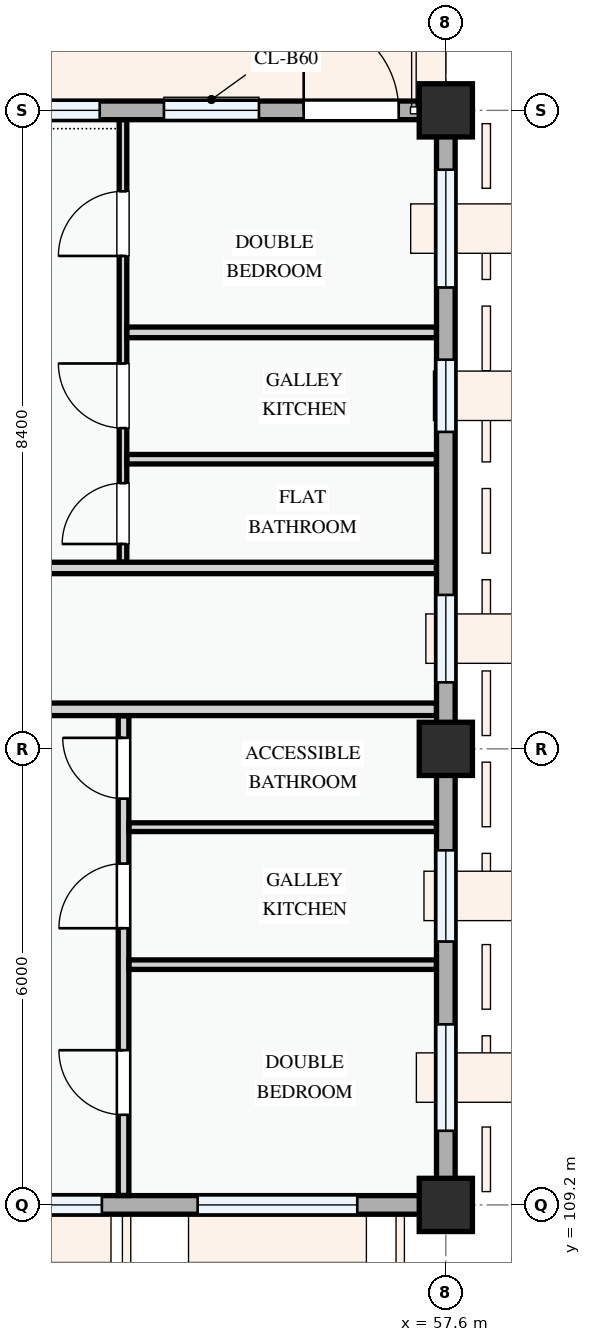
"""IFC4 building model, lengths in metres.
Left out: names, types, materials, properties, quantities, classifications, styles, units other than length and angle.
Written with IfcOpenShell. Run it as: python <this file> out.ifc"""

import sys

from ifc_helpers import new_model, si_unit, direction, frame, frame_2d, origin, origin_2d, place, context, subcontext, project, spatial, rectangle, extrude, element, fill, save


model = new_model("IFC4")
c1 = context("Model", 3, precision=1e-05, world=origin(), true_north=direction((0.0, 1.0)))
c2 = subcontext(c1, "Body", "Model", "MODEL_VIEW")
j1 = project(units=[si_unit("LENGTHUNIT", "METRE"), si_unit("PLANEANGLEUNIT", "RADIAN")], contexts=[c1])
p1 = place(None, origin())
s1 = spatial("IfcSite", under=j1, at=p1, CompositionType="ELEMENT")
p2 = place(p1, origin())
s2 = spatial("IfcBuilding", under=s1, at=p2, CompositionType="ELEMENT")
p3 = place(p2, frame((0.0, 0.0, 8.1)))
s3 = spatial("IfcBuildingStorey", under=s2, at=p3, CompositionType="ELEMENT", Elevation=8.1)
for number, where, z_axis, x_axis in (
    (1, (57.6, 109.2, 0.0), (0.0, 0.0, 1.0), (1.0, 0.0, 0.0)),
    (2, (57.6, 115.2, 0.0), (0.0, 0.0, 1.0), (1.0, 0.0, 0.0)),
    (3, (57.6, 123.6, 0.0), (0.0, 0.0, 1.0), (1.0, 0.0, 0.0)),
):
    element("IfcColumn", number, at=place(p3, frame(where, z_axis=z_axis, x_axis=x_axis)), inside=s3, PredefinedType="COLUMN", context=c2, shape_type="SweptSolid", body=[
        extrude(rectangle(XDim=0.7, YDim=0.7, at=origin_2d()), origin(), (0.0, 0.0, 1.0), 3.3),
    ])
p4 = place(p3, frame((51.6, 109.2, 0.0), z_axis=(0.0, 0.0, 1.0), x_axis=(1.0, 0.0, 0.0)))
e4 = element("IfcWall", 4, at=p4, inside=s3, PredefinedType="STANDARD", context=c2, shape_type="SweptSolid", body=[
    extrude(rectangle(XDim=6.0, YDim=0.245, at=frame_2d((3.0, 0.0))), origin(), (0.0, 0.0, 1.0), 2.475),
])
p5 = place(p4, frame((0.475, 0.0, 0.78)))
e5 = element("IfcOpeningElement", 5, at=p5, cuts=e4, PredefinedType="OPENING", context=c2, shape_type="SweptSolid", body=[
    extrude(rectangle(XDim=1.0, YDim=1.25, at=frame_2d((0.5, 0.625))), frame((0.0, 0.133, 0.0), z_axis=(0.0, -1.0, 0.0), x_axis=(1.0, 0.0, 0.0)), (0.0, 0.0, 1.0), 0.265),
])
p6 = place(p4, frame((2.735, 0.0, 0.78)))
e6 = element("IfcOpeningElement", 6, at=p6, cuts=e4, PredefinedType="OPENING", context=c2, shape_type="SweptSolid", body=[
    extrude(rectangle(XDim=2.1, YDim=1.55, at=frame_2d((1.05, 0.775))), frame((0.0, 0.133, 0.0), z_axis=(0.0, -1.0, 0.0), x_axis=(1.0, 0.0, 0.0)), (0.0, 0.0, 1.0), 0.265),
])
p7 = place(p3, frame((57.6, 109.2, 0.0), z_axis=(0.0, 0.0, 1.0), x_axis=(0.0, 1.0, 0.0)))
e7 = element("IfcWall", 7, at=p7, inside=s3, PredefinedType="STANDARD", context=c2, shape_type="SweptSolid", body=[
    extrude(rectangle(XDim=6.0, YDim=0.245, at=frame_2d((3.0, 0.0))), origin(), (0.0, 0.0, 1.0), 2.575),
])
p8 = place(p7, frame((0.975, 0.0, 0.78)))
e8 = element("IfcOpeningElement", 8, at=p8, cuts=e7, PredefinedType="OPENING", context=c2, shape_type="SweptSolid", body=[
    extrude(rectangle(XDim=1.4, YDim=1.45, at=frame_2d((0.7, 0.725))), frame((0.0, 0.133, 0.0), z_axis=(0.0, -1.0, 0.0), x_axis=(1.0, 0.0, 0.0)), (0.0, 0.0, 1.0), 0.265),
])
p9 = place(p7, frame((3.465, 0.0, 0.78)))
e9 = element("IfcOpeningElement", 9, at=p9, cuts=e7, PredefinedType="OPENING", context=c2, shape_type="SweptSolid", body=[
    extrude(rectangle(XDim=1.2, YDim=1.35, at=frame_2d((0.6, 0.675))), frame((0.0, 0.133, 0.0), z_axis=(0.0, -1.0, 0.0), x_axis=(1.0, 0.0, 0.0)), (0.0, 0.0, 1.0), 0.265),
])
p10 = place(p3, frame((57.6, 115.2, 0.0), z_axis=(0.0, 0.0, 1.0), x_axis=(0.0, 1.0, 0.0)))
e10 = element("IfcWall", 10, at=p10, inside=s3, PredefinedType="STANDARD", context=c2, shape_type="SweptSolid", body=[
    extrude(rectangle(XDim=8.4, YDim=0.245, at=frame_2d((4.2, 0.0))), origin(), (0.0, 0.0, 1.0), 2.425),
])
p11 = place(p10, frame((0.875, 0.0, 0.78)))
e11 = element("IfcOpeningElement", 11, at=p11, cuts=e10, PredefinedType="OPENING", context=c2, shape_type="SweptSolid", body=[
    extrude(rectangle(XDim=1.15, YDim=1.25, at=frame_2d((0.575, 0.625))), frame((0.0, 0.133, 0.0), z_axis=(0.0, -1.0, 0.0), x_axis=(1.0, 0.0, 0.0)), (0.0, 0.0, 1.0), 0.265),
])
p12 = place(p10, frame((4.17, 0.0, 0.78)))
e12 = element("IfcOpeningElement", 12, at=p12, cuts=e10, PredefinedType="OPENING", context=c2, shape_type="SweptSolid", body=[
    extrude(rectangle(XDim=0.95, YDim=1.15, at=frame_2d((0.475, 0.575))), frame((0.0, 0.133, 0.0), z_axis=(0.0, -1.0, 0.0), x_axis=(1.0, 0.0, 0.0)), (0.0, 0.0, 1.0), 0.265),
])
p13 = place(p10, frame((6.07, 0.0, 0.78)))
e13 = element("IfcOpeningElement", 13, at=p13, cuts=e10, PredefinedType="OPENING", context=c2, shape_type="SweptSolid", body=[
    extrude(rectangle(XDim=1.55, YDim=1.4, at=frame_2d((0.775, 0.7))), frame((0.0, 0.133, 0.0), z_axis=(0.0, -1.0, 0.0), x_axis=(1.0, 0.0, 0.0)), (0.0, 0.0, 1.0), 0.265),
])
p14 = place(p3, frame((57.6, 123.6, 0.0), z_axis=(0.0, 0.0, 1.0), x_axis=(-1.0, 0.0, 0.0)))
e14 = element("IfcWall", 14, at=p14, inside=s3, PredefinedType="STANDARD", context=c2, shape_type="SweptSolid", body=[
    extrude(rectangle(XDim=6.0, YDim=0.245, at=frame_2d((3.0, 0.0))), origin(), (0.0, 0.0, 1.0), 2.445),
])
p15 = place(p14, frame((0.62, 0.0, 0.0)))
e15 = element("IfcOpeningElement", 15, at=p15, cuts=e14, PredefinedType="OPENING", context=c2, shape_type="SweptSolid", body=[
    extrude(rectangle(XDim=1.25, YDim=2.2, at=frame_2d((0.625, 1.1))), frame((0.0, 0.133, 0.0), z_axis=(0.0, -1.0, 0.0), x_axis=(1.0, 0.0, 0.0)), (0.0, 0.0, 1.0), 0.265),
])
p16 = place(p14, frame((2.458, 0.0, 0.78)))
e16 = element("IfcOpeningElement", 16, at=p16, cuts=e14, PredefinedType="OPENING", context=c2, shape_type="SweptSolid", body=[
    extrude(rectangle(XDim=1.25, YDim=1.45, at=frame_2d((0.625, 0.725))), frame((0.0, 0.133, 0.0), z_axis=(0.0, -1.0, 0.0), x_axis=(1.0, 0.0, 0.0)), (0.0, 0.0, 1.0), 0.265),
])
p17 = place(p14, frame((4.554, 0.0, 0.78)))
e17 = element("IfcOpeningElement", 17, at=p17, cuts=e14, PredefinedType="OPENING", context=c2, shape_type="SweptSolid", body=[
    extrude(rectangle(XDim=0.95, YDim=1.15, at=frame_2d((0.475, 0.575))), frame((0.0, 0.133, 0.0), z_axis=(0.0, -1.0, 0.0), x_axis=(1.0, 0.0, 0.0)), (0.0, 0.0, 1.0), 0.265),
])
p18 = place(p3, frame((53.36, 109.324, 0.0), z_axis=(0.0, 0.0, 1.0), x_axis=(0.0, 1.0, 0.0)))
e18 = element("IfcWall", 18, at=p18, inside=s3, PredefinedType="PARTITIONING", context=c2, shape_type="SweptSolid", body=[
    extrude(rectangle(XDim=6.311, YDim=0.14, at=frame_2d((3.156, 0.0))), origin(), (0.0, 0.0, 1.0), 3.0),
])
p19 = place(p18, frame((1.061, 0.0, 0.0)))
e19 = element("IfcOpeningElement", 19, at=p19, cuts=e18, PredefinedType="OPENING", context=c2, shape_type="SweptSolid", body=[
    extrude(rectangle(XDim=0.85, YDim=2.1, at=frame_2d((0.425, 1.05))), frame((0.0, 0.08, 0.0), z_axis=(0.0, -1.0, 0.0), x_axis=(1.0, 0.0, 0.0)), (0.0, 0.0, 1.0), 0.16),
])
p20 = place(p18, frame((3.516, 0.0, 0.0)))
e20 = element("IfcOpeningElement", 20, at=p20, cuts=e18, PredefinedType="OPENING", context=c2, shape_type="SweptSolid", body=[
    extrude(rectangle(XDim=0.85, YDim=2.1, at=frame_2d((0.425, 1.05))), frame((0.0, 0.08, 0.0), z_axis=(0.0, -1.0, 0.0), x_axis=(1.0, 0.0, 0.0)), (0.0, 0.0, 1.0), 0.16),
])
p21 = place(p18, frame((5.22, 0.0, 0.0)))
e21 = element("IfcOpeningElement", 21, at=p21, cuts=e18, PredefinedType="OPENING", context=c2, shape_type="SweptSolid", body=[
    extrude(rectangle(XDim=0.8, YDim=2.1, at=frame_2d((0.4, 1.05))), frame((0.0, 0.08, 0.0), z_axis=(0.0, -1.0, 0.0), x_axis=(1.0, 0.0, 0.0)), (0.0, 0.0, 1.0), 0.16),
])
p22 = place(p3, frame((53.432, 112.361, 0.0), z_axis=(0.0, 0.0, 1.0), x_axis=(1.0, 0.0, 0.0)))
e22 = element("IfcWall", 22, at=p22, inside=s3, PredefinedType="PARTITIONING", context=c2, shape_type="SweptSolid", body=[
    extrude(rectangle(XDim=4.044, YDim=0.125, at=frame_2d((2.022, 0.0))), origin(), (0.0, 0.0, 1.0), 3.0),
])
p23 = place(p3, frame((53.432, 114.17, 0.0), z_axis=(0.0, 0.0, 1.0), x_axis=(1.0, 0.0, 0.0)))
e23 = element("IfcWall", 23, at=p23, inside=s3, PredefinedType="PARTITIONING", context=c2, shape_type="SweptSolid", body=[
    extrude(rectangle(XDim=4.044, YDim=0.115, at=frame_2d((2.022, 0.0))), origin(), (0.0, 0.0, 1.0), 3.0),
])
p24 = place(p3, frame((53.353, 117.657, 0.0), z_axis=(0.0, 0.0, 1.0), x_axis=(0.0, 1.0, 0.0)))
e24 = element("IfcWall", 24, at=p24, inside=s3, PredefinedType="PARTITIONING", context=c2, shape_type="SweptSolid", body=[
    extrude(rectangle(XDim=5.819, YDim=0.1, at=frame_2d((2.909, 0.0))), origin(), (0.0, 0.0, 1.0), 3.0),
])
p25 = place(p24, frame((0.238, 0.0, 0.0)))
e25 = element("IfcOpeningElement", 25, at=p25, cuts=e24, PredefinedType="OPENING", context=c2, shape_type="SweptSolid", body=[
    extrude(rectangle(XDim=0.8, YDim=2.1, at=frame_2d((0.4, 1.05))), frame((0.0, 0.06, 0.0), z_axis=(0.0, -1.0, 0.0), x_axis=(1.0, 0.0, 0.0)), (0.0, 0.0, 1.0), 0.12),
])
p26 = place(p24, frame((1.763, 0.0, 0.0)))
e26 = element("IfcOpeningElement", 26, at=p26, cuts=e24, PredefinedType="OPENING", context=c2, shape_type="SweptSolid", body=[
    extrude(rectangle(XDim=0.85, YDim=2.1, at=frame_2d((0.425, 1.05))), frame((0.0, 0.06, 0.0), z_axis=(0.0, -1.0, 0.0), x_axis=(1.0, 0.0, 0.0)), (0.0, 0.0, 1.0), 0.12),
])
p27 = place(p24, frame((4.028, 0.0, 0.0)))
e27 = element("IfcOpeningElement", 27, at=p27, cuts=e24, PredefinedType="OPENING", context=c2, shape_type="SweptSolid", body=[
    extrude(rectangle(XDim=0.85, YDim=2.1, at=frame_2d((0.425, 1.05))), frame((0.0, 0.06, 0.0), z_axis=(0.0, -1.0, 0.0), x_axis=(1.0, 0.0, 0.0)), (0.0, 0.0, 1.0), 0.12),
])
p28 = place(p3, frame((53.405, 120.679, 0.0), z_axis=(0.0, 0.0, 1.0), x_axis=(1.0, 0.0, 0.0)))
e28 = element("IfcWall", 28, at=p28, inside=s3, PredefinedType="PARTITIONING", context=c2, shape_type="SweptSolid", body=[
    extrude(rectangle(XDim=4.071, YDim=0.14, at=frame_2d((2.035, 0.0))), origin(), (0.0, 0.0, 1.0), 3.0),
])
p29 = place(p3, frame((53.405, 119.01, 0.0), z_axis=(0.0, 0.0, 1.0), x_axis=(1.0, 0.0, 0.0)))
e29 = element("IfcWall", 29, at=p29, inside=s3, PredefinedType="PARTITIONING", context=c2, shape_type="SweptSolid", body=[
    extrude(rectangle(XDim=4.071, YDim=0.125, at=frame_2d((2.035, 0.0))), origin(), (0.0, 0.0, 1.0), 3.0),
])
p30 = place(p3, frame((25.15, 115.72, 0.0), z_axis=(0.0, 0.0, 1.0), x_axis=(1.0, 0.0, 0.0)))
e30 = element("IfcWall", 30, at=p30, inside=s3, PredefinedType="PARTITIONING", context=c2, shape_type="SweptSolid", body=[
    extrude(rectangle(XDim=32.326, YDim=0.165, at=frame_2d((16.163, 0.0))), origin(), (0.0, 0.0, 1.0), 3.0),
])
p31 = place(p30, frame((0.25, 0.0, 0.0)))
e31 = element("IfcOpeningElement", 31, at=p31, cuts=e30, PredefinedType="OPENING", context=c2, shape_type="SweptSolid", body=[
    extrude(rectangle(XDim=0.92, YDim=2.1, at=frame_2d((0.46, 1.05))), frame((0.0, 0.093, 0.0), z_axis=(0.0, -1.0, 0.0), x_axis=(1.0, 0.0, 0.0)), (0.0, 0.0, 1.0), 0.185),
])
p32 = place(p30, frame((14.548, 0.0, 0.0)))
e32 = element("IfcOpeningElement", 32, at=p32, cuts=e30, PredefinedType="OPENING", context=c2, shape_type="SweptSolid", body=[
    extrude(rectangle(XDim=0.92, YDim=2.1, at=frame_2d((0.46, 1.05))), frame((0.0, 0.093, 0.0), z_axis=(0.0, -1.0, 0.0), x_axis=(1.0, 0.0, 0.0)), (0.0, 0.0, 1.0), 0.185),
])
p33 = place(p30, frame((22.28, 0.0, 0.0)))
e33 = element("IfcOpeningElement", 33, at=p33, cuts=e30, PredefinedType="OPENING", context=c2, shape_type="SweptSolid", body=[
    extrude(rectangle(XDim=0.92, YDim=2.1, at=frame_2d((0.46, 1.05))), frame((0.0, 0.093, 0.0), z_axis=(0.0, -1.0, 0.0), x_axis=(1.0, 0.0, 0.0)), (0.0, 0.0, 1.0), 0.185),
])
p34 = place(p3, frame((22.66, 117.58, 0.0), z_axis=(0.0, 0.0, 1.0), x_axis=(1.0, 0.0, 0.0)))
e34 = element("IfcWall", 34, at=p34, inside=s3, PredefinedType="PARTITIONING", context=c2, shape_type="SweptSolid", body=[
    extrude(rectangle(XDim=34.816, YDim=0.15, at=frame_2d((17.408, 0.0))), origin(), (0.0, 0.0, 1.0), 3.0),
])
p35 = place(p34, frame((2.74, 0.0, 0.0)))
e35 = element("IfcOpeningElement", 35, at=p35, cuts=e34, PredefinedType="OPENING", context=c2, shape_type="SweptSolid", body=[
    extrude(rectangle(XDim=0.92, YDim=2.1, at=frame_2d((0.46, 1.05))), frame((0.0, 0.085, 0.0), z_axis=(0.0, -1.0, 0.0), x_axis=(1.0, 0.0, 0.0)), (0.0, 0.0, 1.0), 0.17),
])
p36 = place(p34, frame((17.085, 0.0, 0.0)))
e36 = element("IfcOpeningElement", 36, at=p36, cuts=e34, PredefinedType="OPENING", context=c2, shape_type="SweptSolid", body=[
    extrude(rectangle(XDim=0.96, YDim=2.12, at=frame_2d((0.48, 1.06))), frame((0.0, 0.085, 0.0), z_axis=(0.0, -1.0, 0.0), x_axis=(1.0, 0.0, 0.0)), (0.0, 0.0, 1.0), 0.17),
])
p37 = place(p34, frame((24.77, 0.0, 0.0)))
e37 = element("IfcOpeningElement", 37, at=p37, cuts=e34, PredefinedType="OPENING", context=c2, shape_type="SweptSolid", body=[
    extrude(rectangle(XDim=0.92, YDim=2.1, at=frame_2d((0.46, 1.05))), frame((0.0, 0.085, 0.0), z_axis=(0.0, -1.0, 0.0), x_axis=(1.0, 0.0, 0.0)), (0.0, 0.0, 1.0), 0.17),
])
p38 = place(p5, origin())
e38 = element("IfcWindow", 38, at=p38, inside=s3, PartitioningType="SINGLE_PANEL", PredefinedType="WINDOW", context=c2, shape_type="SweptSolid", body=[
    extrude(rectangle(XDim=1.0, YDim=1.25, at=frame_2d((0.5, 0.625))), frame((0.0, 0.03, 0.0), z_axis=(0.0, -1.0, 0.0), x_axis=(1.0, 0.0, 0.0)), (0.0, 0.0, 1.0), 0.06),
])
fill(e5, e38)
p39 = place(p6, origin())
e39 = element("IfcWindow", 39, at=p39, inside=s3, PartitioningType="DOUBLE_PANEL_VERTICAL", PredefinedType="WINDOW", context=c2, shape_type="SweptSolid", body=[
    extrude(rectangle(XDim=2.1, YDim=1.55, at=frame_2d((1.05, 0.775))), frame((0.0, 0.03, 0.0), z_axis=(0.0, -1.0, 0.0), x_axis=(1.0, 0.0, 0.0)), (0.0, 0.0, 1.0), 0.06),
])
fill(e6, e39)
p40 = place(p8, origin())
e40 = element("IfcWindow", 40, at=p40, inside=s3, PartitioningType="SINGLE_PANEL", PredefinedType="WINDOW", context=c2, shape_type="SweptSolid", body=[
    extrude(rectangle(XDim=1.4, YDim=1.45, at=frame_2d((0.7, 0.725))), frame((0.0, 0.03, 0.0), z_axis=(0.0, -1.0, 0.0), x_axis=(1.0, 0.0, 0.0)), (0.0, 0.0, 1.0), 0.06),
])
fill(e8, e40)
p41 = place(p9, origin())
e41 = element("IfcWindow", 41, at=p41, inside=s3, PartitioningType="SINGLE_PANEL", PredefinedType="WINDOW", context=c2, shape_type="SweptSolid", body=[
    extrude(rectangle(XDim=1.2, YDim=1.35, at=frame_2d((0.6, 0.675))), frame((0.0, 0.03, 0.0), z_axis=(0.0, -1.0, 0.0), x_axis=(1.0, 0.0, 0.0)), (0.0, 0.0, 1.0), 0.06),
])
fill(e9, e41)
p42 = place(p11, origin())
e42 = element("IfcWindow", 42, at=p42, inside=s3, PartitioningType="SINGLE_PANEL", PredefinedType="WINDOW", context=c2, shape_type="SweptSolid", body=[
    extrude(rectangle(XDim=1.15, YDim=1.25, at=frame_2d((0.575, 0.625))), frame((0.0, 0.03, 0.0), z_axis=(0.0, -1.0, 0.0), x_axis=(1.0, 0.0, 0.0)), (0.0, 0.0, 1.0), 0.06),
])
fill(e11, e42)
p43 = place(p12, origin())
e43 = element("IfcWindow", 43, at=p43, inside=s3, PartitioningType="SINGLE_PANEL", PredefinedType="WINDOW", context=c2, shape_type="SweptSolid", body=[
    extrude(rectangle(XDim=0.95, YDim=1.15, at=frame_2d((0.475, 0.575))), frame((0.0, 0.03, 0.0), z_axis=(0.0, -1.0, 0.0), x_axis=(1.0, 0.0, 0.0)), (0.0, 0.0, 1.0), 0.06),
])
fill(e12, e43)
p44 = place(p13, origin())
e44 = element("IfcWindow", 44, at=p44, inside=s3, PartitioningType="SINGLE_PANEL", PredefinedType="WINDOW", context=c2, shape_type="SweptSolid", body=[
    extrude(rectangle(XDim=1.55, YDim=1.4, at=frame_2d((0.775, 0.7))), frame((0.0, 0.03, 0.0), z_axis=(0.0, -1.0, 0.0), x_axis=(1.0, 0.0, 0.0)), (0.0, 0.0, 1.0), 0.06),
])
fill(e13, e44)
p45 = place(p15, frame((1.25, 0.0, 0.0), z_axis=(0.0, 0.0, 1.0), x_axis=(-1.0, 0.0, 0.0)))
e45 = element("IfcDoor", 45, at=p45, inside=s3, OperationType="SINGLE_SWING_LEFT", PredefinedType="DOOR", context=c2, shape_type="SweptSolid", body=[
    extrude(rectangle(XDim=1.25, YDim=2.2, at=frame_2d((0.625, 1.1))), frame((0.0, 0.025, 0.0), z_axis=(0.0, -1.0, 0.0), x_axis=(1.0, 0.0, 0.0)), (0.0, 0.0, 1.0), 0.05),
])
fill(e15, e45)
p46 = place(p16, origin())
e46 = element("IfcWindow", 46, at=p46, inside=s3, PartitioningType="SINGLE_PANEL", PredefinedType="WINDOW", context=c2, shape_type="SweptSolid", body=[
    extrude(rectangle(XDim=1.25, YDim=1.45, at=frame_2d((0.625, 0.725))), frame((0.0, 0.03, 0.0), z_axis=(0.0, -1.0, 0.0), x_axis=(1.0, 0.0, 0.0)), (0.0, 0.0, 1.0), 0.06),
])
fill(e16, e46)
p47 = place(p17, origin())
e47 = element("IfcWindow", 47, at=p47, inside=s3, PartitioningType="SINGLE_PANEL", PredefinedType="WINDOW", context=c2, shape_type="SweptSolid", body=[
    extrude(rectangle(XDim=0.95, YDim=1.15, at=frame_2d((0.475, 0.575))), frame((0.0, 0.03, 0.0), z_axis=(0.0, -1.0, 0.0), x_axis=(1.0, 0.0, 0.0)), (0.0, 0.0, 1.0), 0.06),
])
fill(e17, e47)
p48 = place(p19, origin())
e48 = element("IfcDoor", 48, at=p48, inside=s3, OperationType="SINGLE_SWING_RIGHT", PredefinedType="DOOR", context=c2, shape_type="SweptSolid", body=[
    extrude(rectangle(XDim=0.85, YDim=2.1, at=frame_2d((0.425, 1.05))), frame((0.0, 0.025, 0.0), z_axis=(0.0, -1.0, 0.0), x_axis=(1.0, 0.0, 0.0)), (0.0, 0.0, 1.0), 0.05),
])
fill(e19, e48)
p49 = place(p20, origin())
e49 = element("IfcDoor", 49, at=p49, inside=s3, OperationType="SINGLE_SWING_LEFT", PredefinedType="DOOR", context=c2, shape_type="SweptSolid", body=[
    extrude(rectangle(XDim=0.85, YDim=2.1, at=frame_2d((0.425, 1.05))), frame((0.0, 0.025, 0.0), z_axis=(0.0, -1.0, 0.0), x_axis=(1.0, 0.0, 0.0)), (0.0, 0.0, 1.0), 0.05),
])
fill(e20, e49)
p50 = place(p21, origin())
e50 = element("IfcDoor", 50, at=p50, inside=s3, OperationType="SINGLE_SWING_RIGHT", PredefinedType="DOOR", context=c2, shape_type="SweptSolid", body=[
    extrude(rectangle(XDim=0.8, YDim=2.1, at=frame_2d((0.4, 1.05))), frame((0.0, 0.025, 0.0), z_axis=(0.0, -1.0, 0.0), x_axis=(1.0, 0.0, 0.0)), (0.0, 0.0, 1.0), 0.05),
])
fill(e21, e50)
p51 = place(p25, origin())
e51 = element("IfcDoor", 51, at=p51, inside=s3, OperationType="SINGLE_SWING_LEFT", PredefinedType="DOOR", context=c2, shape_type="SweptSolid", body=[
    extrude(rectangle(XDim=0.8, YDim=2.1, at=frame_2d((0.4, 1.05))), frame((0.0, 0.025, 0.0), z_axis=(0.0, -1.0, 0.0), x_axis=(1.0, 0.0, 0.0)), (0.0, 0.0, 1.0), 0.05),
])
fill(e25, e51)
p52 = place(p26, origin())
e52 = element("IfcDoor", 52, at=p52, inside=s3, OperationType="SINGLE_SWING_RIGHT", PredefinedType="DOOR", context=c2, shape_type="SweptSolid", body=[
    extrude(rectangle(XDim=0.85, YDim=2.1, at=frame_2d((0.425, 1.05))), frame((0.0, 0.025, 0.0), z_axis=(0.0, -1.0, 0.0), x_axis=(1.0, 0.0, 0.0)), (0.0, 0.0, 1.0), 0.05),
])
fill(e26, e52)
p53 = place(p27, origin())
e53 = element("IfcDoor", 53, at=p53, inside=s3, OperationType="SINGLE_SWING_LEFT", PredefinedType="DOOR", context=c2, shape_type="SweptSolid", body=[
    extrude(rectangle(XDim=0.85, YDim=2.1, at=frame_2d((0.425, 1.05))), frame((0.0, 0.025, 0.0), z_axis=(0.0, -1.0, 0.0), x_axis=(1.0, 0.0, 0.0)), (0.0, 0.0, 1.0), 0.05),
])
fill(e27, e53)
save(model, sys.argv[1])
